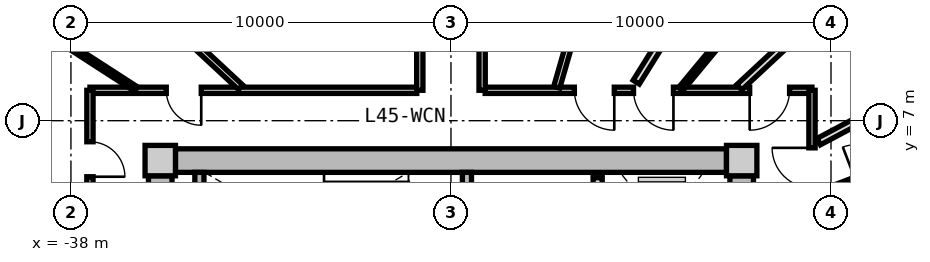
"""IFC4 building model, lengths in metres.
Left out: names, types, materials, properties, quantities, classifications, styles, units other than length and angle.
Written with IfcOpenShell. Run it as: python <this file> out.ifc"""

import sys

from ifc_helpers import new_model, si_unit, direction, frame, frame_2d, origin, origin_2d, place, context, subcontext, project, spatial, rectangle, extrude, source, transform, mapped, element, fill, save


model = new_model("IFC4")
c1 = context("Model", 3, precision=1e-05, world=origin(), true_north=direction((0.0, 1.0)))
c2 = subcontext(c1, "Body", "Model", "MODEL_VIEW")
j1 = project(units=[si_unit("LENGTHUNIT", "METRE"), si_unit("PLANEANGLEUNIT", "RADIAN")], contexts=[c1])
p1 = place(None, origin())
s1 = spatial("IfcSite", under=j1, at=p1, CompositionType="ELEMENT")
p2 = place(p1, origin())
s2 = spatial("IfcBuilding", under=s1, at=p2, CompositionType="ELEMENT")
p3 = place(p2, frame((0.0, 0.0, 146.5)))
s3 = spatial("IfcBuildingStorey", under=s2, at=p3, CompositionType="ELEMENT", Elevation=146.5)
m1 = source(origin(), c2, "Body", "SweptSolid", [
    extrude(rectangle(XDim=0.8, YDim=0.8, at=origin_2d()), origin(), (0.0, 0.0, 1.0), 3.05),
])
for number, where, z_axis, x_axis in (
    (1, (-20.35, 5.95, 0.0), (0.0, 0.0, 1.0), (1.0, 0.0, 0.0)),
    (2, (-35.65, 5.95, 0.0), (0.0, 0.0, 1.0), (1.0, 0.0, 0.0)),
):
    element("IfcColumn", number, at=place(p3, frame(where, z_axis=z_axis, x_axis=x_axis)), inside=s3, PredefinedType="COLUMN", context=c2, shape_type="MappedRepresentation", body=[
        mapped(m1, transform((0.0, 0.0, 0.0), x_axis=(1.0, 0.0, 0.0), y_axis=(0.0, 1.0, 0.0), z_axis=(0.0, 0.0, 1.0), scale=1.0)),
    ])
m2 = source(origin(), c2, "Body", "SweptSolid", [
    extrude(rectangle(XDim=14.5, YDim=0.62, at=frame_2d((7.25, 0.0))), origin(), (0.0, 0.0, 1.0), 2.81),
])
p4 = place(p3, frame((-35.25, 5.95, 0.0), z_axis=(0.0, 0.0, 1.0), x_axis=(1.0, 0.0, 0.0)))
e3 = element("IfcWall", 3, at=p4, inside=s3, PredefinedType="SHEAR", context=c2, shape_type="MappedRepresentation", body=[
    mapped(m2, transform((0.0, 0.0, 0.0), x_axis=(1.0, 0.0, 0.0), y_axis=(0.0, 1.0, 0.0), z_axis=(0.0, 0.0, 1.0), scale=1.0)),
])
m3 = source(origin(), c2, "Body", "SweptSolid", [
    extrude(rectangle(XDim=11.1, YDim=0.62, at=frame_2d((5.55, 0.0))), origin(), (0.0, 0.0, 1.0), 2.81),
])
p5 = place(p3, frame((-35.65, -5.55, 0.0), z_axis=(0.0, 0.0, 1.0), x_axis=(0.0, 1.0, 0.0)))
e4 = element("IfcWall", 4, at=p5, inside=s3, PredefinedType="SHEAR", context=c2, shape_type="MappedRepresentation", body=[
    mapped(m3, transform((0.0, 0.0, 0.0), x_axis=(1.0, 0.0, 0.0), y_axis=(0.0, 1.0, 0.0), z_axis=(0.0, 0.0, 1.0), scale=1.0)),
])
p6 = place(p5, frame((3.8, 0.0, 0.0)))
e5 = element("IfcOpeningElement", 5, at=p6, cuts=e4, PredefinedType="OPENING", context=c2, shape_type="SweptSolid", body=[
    extrude(rectangle(XDim=1.2, YDim=2.15, at=frame_2d((0.6, 1.075))), frame((0.0, 0.32, 0.0), z_axis=(0.0, -1.0, 0.0), x_axis=(1.0, 0.0, 0.0)), (0.0, 0.0, 1.0), 0.64),
])
p7 = place(p3, frame((-20.35, 5.55, 0.0), z_axis=(0.0, 0.0, 1.0), x_axis=(0.0, -1.0, 0.0)))
e6 = element("IfcWall", 6, at=p7, inside=s3, PredefinedType="SHEAR", context=c2, shape_type="MappedRepresentation", body=[
    mapped(m3, transform((0.0, 0.0, 0.0), x_axis=(1.0, 0.0, 0.0), y_axis=(0.0, 1.0, 0.0), z_axis=(0.0, 0.0, 1.0), scale=1.0)),
])
p8 = place(p7, frame((5.65, 0.0, 0.0)))
e7 = element("IfcOpeningElement", 7, at=p8, cuts=e6, PredefinedType="OPENING", context=c2, shape_type="SweptSolid", body=[
    extrude(rectangle(XDim=1.2, YDim=2.15, at=frame_2d((0.6, 1.075))), frame((0.0, 0.32, 0.0), z_axis=(0.0, -1.0, 0.0), x_axis=(1.0, 0.0, 0.0)), (0.0, 0.0, 1.0), 0.64),
])
m4 = source(origin(), c2, "Body", "SweptSolid", [
    extrude(rectangle(XDim=3.19, YDim=0.24, at=frame_2d((1.595, 0.0))), origin(), (0.0, 0.0, 1.0), 2.81),
])
p9 = place(p3, frame((-34.62, 2.45, 0.0), z_axis=(0.0, 0.0, 1.0), x_axis=(0.0, 1.0, 0.0)))
e8 = element("IfcWall", 8, at=p9, inside=s3, PredefinedType="PARTITIONING", context=c2, shape_type="MappedRepresentation", body=[
    mapped(m4, transform((0.0, 0.0, 0.0), x_axis=(1.0, 0.0, 0.0), y_axis=(0.0, 1.0, 0.0), z_axis=(0.0, 0.0, 1.0), scale=1.0)),
])
p10 = place(p3, frame((-27.58, 2.45, 0.0), z_axis=(0.0, 0.0, 1.0), x_axis=(0.0, 1.0, 0.0)))
e9 = element("IfcWall", 9, at=p10, inside=s3, PredefinedType="PARTITIONING", context=c2, shape_type="MappedRepresentation", body=[
    mapped(m4, transform((0.0, 0.0, 0.0), x_axis=(1.0, 0.0, 0.0), y_axis=(0.0, 1.0, 0.0), z_axis=(0.0, 0.0, 1.0), scale=1.0)),
])
p11 = place(p10, frame((0.55, 0.0, 0.0)))
e10 = element("IfcOpeningElement", 10, at=p11, cuts=e9, PredefinedType="OPENING", context=c2, shape_type="SweptSolid", body=[
    extrude(rectangle(XDim=1.1, YDim=2.15, at=frame_2d((0.55, 1.075))), frame((0.0, 0.13, 0.0), z_axis=(0.0, -1.0, 0.0), x_axis=(1.0, 0.0, 0.0)), (0.0, 0.0, 1.0), 0.26),
])
m5 = source(origin(), c2, "Body", "SweptSolid", [
    extrude(rectangle(XDim=5.0, YDim=0.24, at=frame_2d((2.5, 0.0))), origin(), (0.0, 0.0, 1.0), 2.795),
])
p12 = place(p3, frame((-24.14, 0.5, 0.0), z_axis=(0.0, 0.0, 1.0), x_axis=(0.0, 1.0, 0.0)))
e11 = element("IfcWall", 11, at=p12, inside=s3, PredefinedType="PARTITIONING", context=c2, shape_type="MappedRepresentation", body=[
    mapped(m5, transform((0.0, 0.0, 0.0), x_axis=(1.0, 0.0, 0.0), y_axis=(0.0, 1.0, 0.0), z_axis=(0.0, 0.0, 1.0), scale=1.0)),
])
p13 = place(p12, frame((3.05, 0.0, 0.0)))
e12 = element("IfcOpeningElement", 12, at=p13, cuts=e11, PredefinedType="OPENING", context=c2, shape_type="SweptSolid", body=[
    extrude(rectangle(XDim=1.3, YDim=2.2, at=frame_2d((0.65, 1.1))), frame((0.0, 0.13, 0.0), z_axis=(0.0, -1.0, 0.0), x_axis=(1.0, 0.0, 0.0)), (0.0, 0.0, 1.0), 0.26),
])
p14 = place(p12, frame((0.55, 0.0, 0.0)))
e13 = element("IfcOpeningElement", 13, at=p14, cuts=e11, PredefinedType="OPENING", context=c2, shape_type="SweptSolid", body=[
    extrude(rectangle(XDim=1.3, YDim=2.2, at=frame_2d((0.65, 1.1))), frame((0.0, 0.13, 0.0), z_axis=(0.0, -1.0, 0.0), x_axis=(1.0, 0.0, 0.0)), (0.0, 0.0, 1.0), 0.26),
])
m6 = source(origin(), c2, "Body", "SweptSolid", [
    extrude(rectangle(XDim=8.6, YDim=0.165, at=frame_2d((4.3, 0.0))), origin(), (0.0, 0.0, 1.0), 2.795),
])
p15 = place(p3, frame((-37.5, 7.8, 0.0), z_axis=(0.0, 0.0, 1.0), x_axis=(1.0, 0.0, 0.0)))
e14 = element("IfcWall", 14, at=p15, inside=s3, PredefinedType="PARTITIONING", context=c2, shape_type="MappedRepresentation", body=[
    mapped(m6, transform((0.0, 0.0, 0.0), x_axis=(1.0, 0.0, 0.0), y_axis=(0.0, 1.0, 0.0), z_axis=(0.0, 0.0, 1.0), scale=1.0)),
])
p16 = place(p15, frame((2.009, 0.0, 0.0)))
e15 = element("IfcOpeningElement", 15, at=p16, cuts=e14, PredefinedType="OPENING", context=c2, shape_type="SweptSolid", body=[
    extrude(rectangle(XDim=0.92, YDim=2.1, at=frame_2d((0.46, 1.05))), frame((0.0, 0.093, 0.0), z_axis=(0.0, -1.0, 0.0), x_axis=(1.0, 0.0, 0.0)), (0.0, 0.0, 1.0), 0.185),
])
p17 = place(p3, frame((-27.1, 7.8, 0.0), z_axis=(0.0, 0.0, 1.0), x_axis=(1.0, 0.0, 0.0)))
e16 = element("IfcWall", 16, at=p17, inside=s3, PredefinedType="PARTITIONING", context=c2, shape_type="MappedRepresentation", body=[
    mapped(m6, transform((0.0, 0.0, 0.0), x_axis=(1.0, 0.0, 0.0), y_axis=(0.0, 1.0, 0.0), z_axis=(0.0, 0.0, 1.0), scale=1.0)),
])
p18 = place(p17, frame((6.96, 0.0, 0.0)))
e17 = element("IfcOpeningElement", 17, at=p18, cuts=e16, PredefinedType="OPENING", context=c2, shape_type="SweptSolid", body=[
    extrude(rectangle(XDim=1.05, YDim=2.15, at=frame_2d((0.525, 1.075))), frame((0.0, 0.093, 0.0), z_axis=(0.0, -1.0, 0.0), x_axis=(1.0, 0.0, 0.0)), (0.0, 0.0, 1.0), 0.185),
])
p19 = place(p17, frame((3.904, 0.0, 0.0)))
e18 = element("IfcOpeningElement", 18, at=p19, cuts=e16, PredefinedType="OPENING", context=c2, shape_type="SweptSolid", body=[
    extrude(rectangle(XDim=1.05, YDim=2.15, at=frame_2d((0.525, 1.075))), frame((0.0, 0.093, 0.0), z_axis=(0.0, -1.0, 0.0), x_axis=(1.0, 0.0, 0.0)), (0.0, 0.0, 1.0), 0.185),
])
p20 = place(p17, frame((2.347, 0.0, 0.0)))
e19 = element("IfcOpeningElement", 19, at=p20, cuts=e16, PredefinedType="OPENING", context=c2, shape_type="SweptSolid", body=[
    extrude(rectangle(XDim=1.05, YDim=2.15, at=frame_2d((0.525, 1.075))), frame((0.0, 0.093, 0.0), z_axis=(0.0, -1.0, 0.0), x_axis=(1.0, 0.0, 0.0)), (0.0, 0.0, 1.0), 0.185),
])
m7 = source(origin(), c2, "Body", "SweptSolid", [
    extrude(rectangle(XDim=15.6, YDim=0.165, at=frame_2d((7.8, 0.0))), origin(), (0.0, 0.0, 1.0), 2.795),
])
p21 = place(p3, frame((-37.5, -7.8, 0.0), z_axis=(0.0, 0.0, 1.0), x_axis=(0.0, 1.0, 0.0)))
e20 = element("IfcWall", 20, at=p21, inside=s3, PredefinedType="PARTITIONING", context=c2, shape_type="MappedRepresentation", body=[
    mapped(m7, transform((0.0, 0.0, 0.0), x_axis=(1.0, 0.0, 0.0), y_axis=(0.0, 1.0, 0.0), z_axis=(0.0, 0.0, 1.0), scale=1.0)),
])
p22 = place(p21, frame((13.325, 0.0, 0.0)))
e21 = element("IfcOpeningElement", 21, at=p22, cuts=e20, PredefinedType="OPENING", context=c2, shape_type="SweptSolid", body=[
    extrude(rectangle(XDim=0.92, YDim=2.1, at=frame_2d((0.46, 1.05))), frame((0.0, 0.093, 0.0), z_axis=(0.0, -1.0, 0.0), x_axis=(1.0, 0.0, 0.0)), (0.0, 0.0, 1.0), 0.185),
])
p23 = place(p21, frame((5.628, 0.0, 0.0)))
e22 = element("IfcOpeningElement", 22, at=p23, cuts=e20, PredefinedType="OPENING", context=c2, shape_type="SweptSolid", body=[
    extrude(rectangle(XDim=1.25, YDim=2.2, at=frame_2d((0.625, 1.1))), frame((0.0, 0.093, 0.0), z_axis=(0.0, -1.0, 0.0), x_axis=(1.0, 0.0, 0.0)), (0.0, 0.0, 1.0), 0.185),
])
p24 = place(p3, frame((-18.5, 7.8, 0.0), z_axis=(0.0, 0.0, 1.0), x_axis=(0.0, -1.0, 0.0)))
e23 = element("IfcWall", 23, at=p24, inside=s3, PredefinedType="PARTITIONING", context=c2, shape_type="MappedRepresentation", body=[
    mapped(m7, transform((0.0, 0.0, 0.0), x_axis=(1.0, 0.0, 0.0), y_axis=(0.0, 1.0, 0.0), z_axis=(0.0, 0.0, 1.0), scale=1.0)),
])
p25 = place(p24, frame((8.314, 0.0, 0.0)))
e24 = element("IfcOpeningElement", 24, at=p25, cuts=e23, PredefinedType="OPENING", context=c2, shape_type="SweptSolid", body=[
    extrude(rectangle(XDim=1.25, YDim=2.2, at=frame_2d((0.625, 1.1))), frame((0.0, 0.093, 0.0), z_axis=(0.0, -1.0, 0.0), x_axis=(1.0, 0.0, 0.0)), (0.0, 0.0, 1.0), 0.185),
])
p26 = place(p24, frame((1.515, 0.0, 0.0)))
e25 = element("IfcOpeningElement", 25, at=p26, cuts=e23, PredefinedType="OPENING", context=c2, shape_type="SweptSolid", body=[
    extrude(rectangle(XDim=1.05, YDim=2.15, at=frame_2d((0.525, 1.075))), frame((0.0, 0.093, 0.0), z_axis=(0.0, -1.0, 0.0), x_axis=(1.0, 0.0, 0.0)), (0.0, 0.0, 1.0), 0.185),
])
m8 = source(origin(), c2, "Body", "SweptSolid", [
    extrude(rectangle(XDim=9.73, YDim=0.165, at=frame_2d((4.865, 0.0))), origin(), (0.0, 0.0, 1.0), 2.345),
])
p27 = place(p3, frame((-25.217, 7.88, 0.0), z_axis=(0.0, 0.0, 1.0), x_axis=(0.27679492614, 0.960929013436, 0.0)))
e26 = element("IfcWall", 26, at=p27, inside=s3, PredefinedType="PARTITIONING", context=c2, shape_type="MappedRepresentation", body=[
    mapped(m8, transform((0.0, 0.0, 0.0), x_axis=(1.0, 0.0, 0.0), y_axis=(0.0, 1.0, 0.0), z_axis=(0.0, 0.0, 1.0), scale=1.0)),
])
m9 = source(origin(), c2, "Body", "SweptSolid", [
    extrude(rectangle(XDim=7.648, YDim=0.165, at=frame_2d((3.824, 0.0))), origin(), (0.0, 0.0, 1.0), 2.345),
])
p28 = place(p3, frame((-33.538, 7.88, 0.0), z_axis=(0.0, 0.0, 1.0), x_axis=(-0.732167856666, 0.681124239522, 0.0)))
e27 = element("IfcWall", 27, at=p28, inside=s3, PredefinedType="PARTITIONING", context=c2, shape_type="MappedRepresentation", body=[
    mapped(m9, transform((0.0, 0.0, 0.0), x_axis=(1.0, 0.0, 0.0), y_axis=(0.0, 1.0, 0.0), z_axis=(0.0, 0.0, 1.0), scale=1.0)),
])
m10 = source(origin(), c2, "Body", "SweptSolid", [
    extrude(rectangle(XDim=8.235, YDim=0.165, at=frame_2d((4.118, 0.0))), origin(), (0.0, 0.0, 1.0), 2.795),
])
p29 = place(p3, frame((-28.82, 7.8, 0.0), z_axis=(0.0, 0.0, 1.0), x_axis=(0.0, 1.0, 0.0)))
e28 = element("IfcWall", 28, at=p29, inside=s3, PredefinedType="PARTITIONING", context=c2, shape_type="MappedRepresentation", body=[
    mapped(m10, transform((0.0, 0.0, 0.0), x_axis=(1.0, 0.0, 0.0), y_axis=(0.0, 1.0, 0.0), z_axis=(0.0, 0.0, 1.0), scale=1.0)),
])
p30 = place(p29, frame((3.593, 0.0, 0.0)))
e29 = element("IfcOpeningElement", 29, at=p30, cuts=e28, PredefinedType="OPENING", context=c2, shape_type="SweptSolid", body=[
    extrude(rectangle(XDim=1.05, YDim=2.15, at=frame_2d((0.525, 1.075))), frame((0.0, 0.093, 0.0), z_axis=(0.0, -1.0, 0.0), x_axis=(1.0, 0.0, 0.0)), (0.0, 0.0, 1.0), 0.185),
])
p31 = place(p3, frame((-27.18, 7.8, 0.0), z_axis=(0.0, 0.0, 1.0), x_axis=(0.0, 1.0, 0.0)))
e30 = element("IfcWall", 30, at=p31, inside=s3, PredefinedType="PARTITIONING", context=c2, shape_type="MappedRepresentation", body=[
    mapped(m10, transform((0.0, 0.0, 0.0), x_axis=(1.0, 0.0, 0.0), y_axis=(0.0, 1.0, 0.0), z_axis=(0.0, 0.0, 1.0), scale=1.0)),
])
p32 = place(p31, frame((3.593, 0.0, 0.0)))
e31 = element("IfcOpeningElement", 31, at=p32, cuts=e30, PredefinedType="OPENING", context=c2, shape_type="SweptSolid", body=[
    extrude(rectangle(XDim=1.05, YDim=2.15, at=frame_2d((0.525, 1.075))), frame((0.0, 0.093, 0.0), z_axis=(0.0, -1.0, 0.0), x_axis=(1.0, 0.0, 0.0)), (0.0, 0.0, 1.0), 0.185),
])
m11 = source(origin(), c2, "Body", "SweptSolid", [
    extrude(rectangle(XDim=6.193, YDim=0.19, at=frame_2d((3.096, 0.0))), origin(), (0.0, 0.0, 1.0), 2.345),
])
p33 = place(p3, frame((-37.58, 4.419, 0.0), z_axis=(0.0, 0.0, 1.0), x_axis=(-0.970309243466, 0.241867674657, 0.0)))
e32 = element("IfcWall", 32, at=p33, inside=s3, PredefinedType="PARTITIONING", context=c2, shape_type="MappedRepresentation", body=[
    mapped(m11, transform((0.0, 0.0, 0.0), x_axis=(1.0, 0.0, 0.0), y_axis=(0.0, 1.0, 0.0), z_axis=(0.0, 0.0, 1.0), scale=1.0)),
])
m12 = source(origin(), c2, "Body", "SweptSolid", [
    extrude(rectangle(XDim=5.197, YDim=0.14, at=frame_2d((2.598, 0.0))), origin(), (0.0, 0.0, 1.0), 2.795),
])
p34 = place(p3, frame((-36.286, 7.83, 0.0), z_axis=(0.0, 0.0, 1.0), x_axis=(-0.839929187515, 0.542696010637, 0.0)))
e33 = element("IfcWall", 33, at=p34, inside=s3, PredefinedType="PARTITIONING", context=c2, shape_type="MappedRepresentation", body=[
    mapped(m12, transform((0.0, 0.0, 0.0), x_axis=(1.0, 0.0, 0.0), y_axis=(0.0, 1.0, 0.0), z_axis=(0.0, 0.0, 1.0), scale=1.0)),
])
m13 = source(origin(), c2, "Body", "SweptSolid", [
    extrude(rectangle(XDim=8.305, YDim=0.19, at=frame_2d((4.153, 0.0))), origin(), (0.0, 0.0, 1.0), 2.345),
])
p35 = place(p3, frame((-18.42, 3.908, 0.0), z_axis=(0.0, 0.0, 1.0), x_axis=(0.970309994378, 0.241864662175, 0.0)))
e34 = element("IfcWall", 34, at=p35, inside=s3, PredefinedType="PARTITIONING", context=c2, shape_type="MappedRepresentation", body=[
    mapped(m13, transform((0.0, 0.0, 0.0), x_axis=(1.0, 0.0, 0.0), y_axis=(0.0, 1.0, 0.0), z_axis=(0.0, 0.0, 1.0), scale=1.0)),
])
m14 = source(origin(), c2, "Body", "SweptSolid", [
    extrude(rectangle(XDim=7.648, YDim=0.19, at=frame_2d((3.824, 0.0))), origin(), (0.0, 0.0, 1.0), 2.345),
])
p36 = place(p3, frame((-20.413, 7.88, 0.0), z_axis=(0.0, 0.0, 1.0), x_axis=(0.732182665826, 0.681108320213, 0.0)))
e35 = element("IfcWall", 35, at=p36, inside=s3, PredefinedType="PARTITIONING", context=c2, shape_type="MappedRepresentation", body=[
    mapped(m14, transform((0.0, 0.0, 0.0), x_axis=(1.0, 0.0, 0.0), y_axis=(0.0, 1.0, 0.0), z_axis=(0.0, 0.0, 1.0), scale=1.0)),
])
m15 = source(origin(), c2, "Body", "SweptSolid", [
    extrude(rectangle(XDim=6.499, YDim=0.19, at=frame_2d((3.25, 0.0))), origin(), (0.0, 0.0, 1.0), 2.795),
])
p37 = place(p3, frame((-18.324, 6.449, 0.0), z_axis=(0.0, 0.0, 1.0), x_axis=(0.882715595921, 0.469907625729, 0.0)))
e36 = element("IfcWall", 36, at=p37, inside=s3, PredefinedType="PARTITIONING", context=c2, shape_type="MappedRepresentation", body=[
    mapped(m15, transform((0.0, 0.0, 0.0), x_axis=(1.0, 0.0, 0.0), y_axis=(0.0, 1.0, 0.0), z_axis=(0.0, 0.0, 1.0), scale=1.0)),
])
m16 = source(origin(), c2, "Body", "SweptSolid", [
    extrude(rectangle(XDim=3.295, YDim=0.14, at=frame_2d((1.647, 0.0))), origin(), (0.0, 0.0, 1.0), 2.795),
])
p38 = place(p3, frame((-18.47, 5.023, 0.0), z_axis=(0.0, 0.0, 1.0), x_axis=(0.934202224769, 0.356743890258, 0.0)))
e37 = element("IfcWall", 37, at=p38, inside=s3, PredefinedType="PARTITIONING", context=c2, shape_type="MappedRepresentation", body=[
    mapped(m16, transform((0.0, 0.0, 0.0), x_axis=(1.0, 0.0, 0.0), y_axis=(0.0, 1.0, 0.0), z_axis=(0.0, 0.0, 1.0), scale=1.0)),
])
p39 = place(p38, frame((1.188, 0.0, 0.0)))
e38 = element("IfcOpeningElement", 38, at=p39, cuts=e37, PredefinedType="OPENING", context=c2, shape_type="SweptSolid", body=[
    extrude(rectangle(XDim=0.92, YDim=2.1, at=frame_2d((0.46, 1.05))), frame((0.0, 0.08, 0.0), z_axis=(0.0, -1.0, 0.0), x_axis=(1.0, 0.0, 0.0)), (0.0, 0.0, 1.0), 0.16),
])
m17 = source(origin(), c2, "Body", "SweptSolid", [
    extrude(rectangle(XDim=8.422, YDim=0.19, at=frame_2d((4.211, 0.0))), origin(), (0.0, 0.0, 1.0), 2.795),
])
p40 = place(p3, frame((-23.125, 8.014, 0.0), z_axis=(0.0, 0.0, 1.0), x_axis=(0.52925352896, 0.848463730565, 0.0)))
e39 = element("IfcWall", 39, at=p40, inside=s3, PredefinedType="PARTITIONING", context=c2, shape_type="MappedRepresentation", body=[
    mapped(m17, transform((0.0, 0.0, 0.0), x_axis=(1.0, 0.0, 0.0), y_axis=(0.0, 1.0, 0.0), z_axis=(0.0, 0.0, 1.0), scale=1.0)),
])
m18 = source(origin(), c2, "Body", "SweptSolid", [
    extrude(rectangle(XDim=3.593, YDim=0.14, at=frame_2d((1.797, 0.0))), origin(), (0.0, 0.0, 1.0), 2.795),
])
p41 = place(p3, frame((-21.955, 7.83, 0.0), z_axis=(0.0, 0.0, 1.0), x_axis=(0.638271060163, 0.769811700196, 0.0)))
e40 = element("IfcWall", 40, at=p41, inside=s3, PredefinedType="PARTITIONING", context=c2, shape_type="MappedRepresentation", body=[
    mapped(m18, transform((0.0, 0.0, 0.0), x_axis=(1.0, 0.0, 0.0), y_axis=(0.0, 1.0, 0.0), z_axis=(0.0, 0.0, 1.0), scale=1.0)),
])
p42 = place(p41, frame((1.337, 0.0, 0.0)))
e41 = element("IfcOpeningElement", 41, at=p42, cuts=e40, PredefinedType="OPENING", context=c2, shape_type="SweptSolid", body=[
    extrude(rectangle(XDim=0.92, YDim=2.1, at=frame_2d((0.46, 1.05))), frame((0.0, 0.08, 0.0), z_axis=(0.0, -1.0, 0.0), x_axis=(1.0, 0.0, 0.0)), (0.0, 0.0, 1.0), 0.16),
])
m19 = source(origin(), c2, "Body", "SweptSolid", [
    extrude(rectangle(XDim=0.92, YDim=2.1, at=frame_2d((0.46, 1.05))), frame((0.0, 0.025, 0.0), z_axis=(0.0, -1.0, 0.0), x_axis=(1.0, 0.0, 0.0)), (0.0, 0.0, 1.0), 0.05),
])
p43 = place(p16, frame((0.92, 0.0, 0.0), z_axis=(0.0, 0.0, 1.0), x_axis=(-1.0, 0.0, 0.0)))
e42 = element("IfcDoor", 42, at=p43, inside=s3, OperationType="SINGLE_SWING_LEFT", PredefinedType="DOOR", context=c2, shape_type="MappedRepresentation", body=[
    mapped(m19, transform((0.0, 0.0, 0.0), x_axis=(1.0, 0.0, 0.0), y_axis=(0.0, 1.0, 0.0), z_axis=(0.0, 0.0, 1.0), scale=1.0)),
])
fill(e15, e42)
p44 = place(p22, frame((0.92, 0.0, 0.0), z_axis=(0.0, 0.0, 1.0), x_axis=(-1.0, 0.0, 0.0)))
e43 = element("IfcDoor", 43, at=p44, inside=s3, OperationType="SINGLE_SWING_RIGHT", PredefinedType="DOOR", context=c2, shape_type="MappedRepresentation", body=[
    mapped(m19, transform((0.0, 0.0, 0.0), x_axis=(1.0, 0.0, 0.0), y_axis=(0.0, 1.0, 0.0), z_axis=(0.0, 0.0, 1.0), scale=1.0)),
])
fill(e21, e43)
m20 = source(origin(), c2, "Body", "SweptSolid", [
    extrude(rectangle(XDim=1.05, YDim=2.15, at=frame_2d((0.525, 1.075))), frame((0.0, 0.025, 0.0), z_axis=(0.0, -1.0, 0.0), x_axis=(1.0, 0.0, 0.0)), (0.0, 0.0, 1.0), 0.05),
])
p45 = place(p26, frame((1.05, 0.0, 0.0), z_axis=(0.0, 0.0, 1.0), x_axis=(-1.0, 0.0, 0.0)))
e44 = element("IfcDoor", 44, at=p45, inside=s3, OperationType="SINGLE_SWING_RIGHT", PredefinedType="DOOR", context=c2, shape_type="MappedRepresentation", body=[
    mapped(m20, transform((0.0, 0.0, 0.0), x_axis=(1.0, 0.0, 0.0), y_axis=(0.0, 1.0, 0.0), z_axis=(0.0, 0.0, 1.0), scale=1.0)),
])
fill(e25, e44)
p46 = place(p18, frame((1.05, 0.0, 0.0), z_axis=(0.0, 0.0, 1.0), x_axis=(-1.0, 0.0, 0.0)))
e45 = element("IfcDoor", 45, at=p46, inside=s3, OperationType="SINGLE_SWING_RIGHT", PredefinedType="DOOR", context=c2, shape_type="MappedRepresentation", body=[
    mapped(m20, transform((0.0, 0.0, 0.0), x_axis=(1.0, 0.0, 0.0), y_axis=(0.0, 1.0, 0.0), z_axis=(0.0, 0.0, 1.0), scale=1.0)),
])
fill(e17, e45)
p47 = place(p19, frame((1.05, 0.0, 0.0), z_axis=(0.0, 0.0, 1.0), x_axis=(-1.0, 0.0, 0.0)))
e46 = element("IfcDoor", 46, at=p47, inside=s3, OperationType="SINGLE_SWING_LEFT", PredefinedType="DOOR", context=c2, shape_type="MappedRepresentation", body=[
    mapped(m20, transform((0.0, 0.0, 0.0), x_axis=(1.0, 0.0, 0.0), y_axis=(0.0, 1.0, 0.0), z_axis=(0.0, 0.0, 1.0), scale=1.0)),
])
fill(e18, e46)
p48 = place(p20, frame((1.05, 0.0, 0.0), z_axis=(0.0, 0.0, 1.0), x_axis=(-1.0, 0.0, 0.0)))
e47 = element("IfcDoor", 47, at=p48, inside=s3, OperationType="SINGLE_SWING_LEFT", PredefinedType="DOOR", context=c2, shape_type="MappedRepresentation", body=[
    mapped(m20, transform((0.0, 0.0, 0.0), x_axis=(1.0, 0.0, 0.0), y_axis=(0.0, 1.0, 0.0), z_axis=(0.0, 0.0, 1.0), scale=1.0)),
])
fill(e19, e47)
save(model, sys.argv[1])
